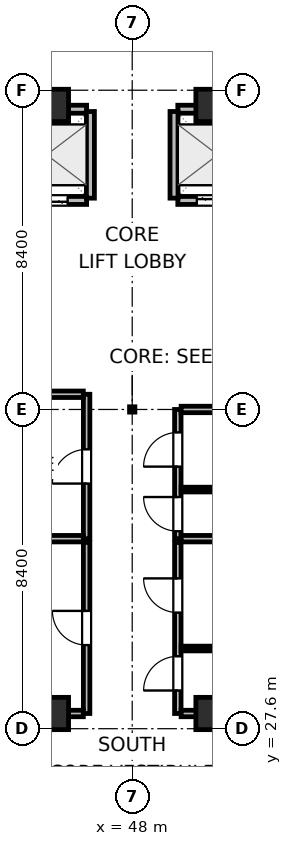
"""IFC4 building model, lengths in metres.
Left out: names, types, materials, properties, quantities, classifications, styles, units other than length and angle.
Written with IfcOpenShell. Run it as: python <this file> out.ifc"""

import sys

from ifc_helpers import new_model, si_unit, direction, frame, frame_2d, origin, origin_2d, place, context, subcontext, project, spatial, rectangle, extrude, element, fill, save


model = new_model("IFC4")
c1 = context("Model", 3, precision=1e-05, world=origin(), true_north=direction((0.0, 1.0)))
c2 = subcontext(c1, "Body", "Model", "MODEL_VIEW")
j1 = project(units=[si_unit("LENGTHUNIT", "METRE"), si_unit("PLANEANGLEUNIT", "RADIAN")], contexts=[c1])
p1 = place(None, origin())
s1 = spatial("IfcSite", under=j1, at=p1, CompositionType="ELEMENT")
p2 = place(p1, origin())
s2 = spatial("IfcBuilding", under=s1, at=p2, CompositionType="ELEMENT")
p3 = place(p2, frame((0.0, 0.0, 125.4)))
s3 = spatial("IfcBuildingStorey", under=s2, at=p3, CompositionType="ELEMENT", Elevation=125.4)
for number, where, z_axis, x_axis in (
    (1, (45.9, 28.0, 0.0), (0.0, 0.0, 1.0), (1.0, 0.0, 0.0)),
    (2, (50.1, 28.0, 0.0), (0.0, 0.0, 1.0), (1.0, 0.0, 0.0)),
    (3, (45.9, 44.0, 0.0), (0.0, 0.0, 1.0), (1.0, 0.0, 0.0)),
    (4, (50.1, 44.0, 0.0), (0.0, 0.0, 1.0), (1.0, 0.0, 0.0)),
):
    element("IfcColumn", number, at=place(p3, frame(where, z_axis=z_axis, x_axis=x_axis)), inside=s3, PredefinedType="COLUMN", context=c2, shape_type="SweptSolid", body=[
        extrude(rectangle(XDim=0.85, YDim=0.85, at=origin_2d()), origin(), (0.0, 0.0, 1.0), 4.5),
    ])
p4 = place(p3, frame((44.7, 41.5, 0.0), z_axis=(0.0, 0.0, 1.0), x_axis=(1.0, 0.0, 0.0)))
e5 = element("IfcWall", 5, at=p4, inside=s3, PredefinedType="PARTITIONING", context=c2, shape_type="SweptSolid", body=[
    extrude(rectangle(XDim=2.1, YDim=0.21, at=frame_2d((1.05, 0.0))), origin(), (0.0, 0.0, 1.0), 4.24),
])
p5 = place(p4, frame((0.5, 0.0, 0.0)))
e6 = element("IfcOpeningElement", 6, at=p5, cuts=e5, PredefinedType="OPENING", context=c2, shape_type="SweptSolid", body=[
    extrude(rectangle(XDim=1.1, YDim=2.04, at=frame_2d((0.55, 1.02))), frame((0.0, 0.115, 0.0), z_axis=(0.0, -1.0, 0.0), x_axis=(1.0, 0.0, 0.0)), (0.0, 0.0, 1.0), 0.23),
])
p6 = place(p3, frame((44.7, 43.9, 0.0), z_axis=(0.0, 0.0, 1.0), x_axis=(1.0, 0.0, 0.0)))
e7 = element("IfcWall", 7, at=p6, inside=s3, PredefinedType="PARTITIONING", context=c2, shape_type="SweptSolid", body=[
    extrude(rectangle(XDim=2.1, YDim=0.21, at=frame_2d((1.05, 0.0))), origin(), (0.0, 0.0, 1.0), 3.125),
])
p7 = place(p3, frame((46.9, 41.56, 0.0), z_axis=(0.0, 0.0, 1.0), x_axis=(0.0, 1.0, 0.0)))
e8 = element("IfcWall", 8, at=p7, inside=s3, PredefinedType="PARTITIONING", context=c2, shape_type="SweptSolid", body=[
    extrude(rectangle(XDim=2.28, YDim=0.21, at=frame_2d((1.14, 0.0))), origin(), (0.0, 0.0, 1.0), 4.24),
])
p8 = place(p3, frame((49.2, 41.5, 0.0), z_axis=(0.0, 0.0, 1.0), x_axis=(1.0, 0.0, 0.0)))
e9 = element("IfcWall", 9, at=p8, inside=s3, PredefinedType="PARTITIONING", context=c2, shape_type="SweptSolid", body=[
    extrude(rectangle(XDim=2.1, YDim=0.21, at=frame_2d((1.05, 0.0))), origin(), (0.0, 0.0, 1.0), 4.24),
])
p9 = place(p8, frame((0.5, 0.0, 0.0)))
e10 = element("IfcOpeningElement", 10, at=p9, cuts=e9, PredefinedType="OPENING", context=c2, shape_type="SweptSolid", body=[
    extrude(rectangle(XDim=1.1, YDim=2.04, at=frame_2d((0.55, 1.02))), frame((0.0, 0.115, 0.0), z_axis=(0.0, -1.0, 0.0), x_axis=(1.0, 0.0, 0.0)), (0.0, 0.0, 1.0), 0.23),
])
p10 = place(p3, frame((49.2, 43.9, 0.0), z_axis=(0.0, 0.0, 1.0), x_axis=(1.0, 0.0, 0.0)))
e11 = element("IfcWall", 11, at=p10, inside=s3, PredefinedType="PARTITIONING", context=c2, shape_type="SweptSolid", body=[
    extrude(rectangle(XDim=2.1, YDim=0.21, at=frame_2d((1.05, 0.0))), origin(), (0.0, 0.0, 1.0), 3.125),
])
p11 = place(p3, frame((49.1, 41.56, 0.0), z_axis=(0.0, 0.0, 1.0), x_axis=(0.0, 1.0, 0.0)))
e12 = element("IfcWall", 12, at=p11, inside=s3, PredefinedType="PARTITIONING", context=c2, shape_type="SweptSolid", body=[
    extrude(rectangle(XDim=2.28, YDim=0.21, at=frame_2d((1.14, 0.0))), origin(), (0.0, 0.0, 1.0), 4.24),
])
p12 = place(p3, frame((46.8, 32.6, 0.0), z_axis=(0.0, 0.0, 1.0), x_axis=(0.0, 1.0, 0.0)))
e13 = element("IfcWall", 13, at=p12, inside=s3, PredefinedType="PARTITIONING", context=c2, shape_type="SweptSolid", body=[
    extrude(rectangle(XDim=3.8, YDim=0.17, at=frame_2d((1.9, 0.0))), origin(), (0.0, 0.0, 1.0), 4.24),
])
p13 = place(p12, frame((1.45, 0.0, 0.0)))
e14 = element("IfcOpeningElement", 14, at=p13, cuts=e13, PredefinedType="OPENING", context=c2, shape_type="SweptSolid", body=[
    extrude(rectangle(XDim=0.9, YDim=2.02, at=frame_2d((0.45, 1.01))), frame((0.0, 0.095, 0.0), z_axis=(0.0, -1.0, 0.0), x_axis=(1.0, 0.0, 0.0)), (0.0, 0.0, 1.0), 0.19),
])
for number, where, z_axis, x_axis in (
    (15, (43.8, 32.6, 0.0), (0.0, 0.0, 1.0), (1.0, 0.0, 0.0)),
    (16, (43.8, 36.4, 0.0), (0.0, 0.0, 1.0), (1.0, 0.0, 0.0)),
):
    element("IfcWall", number, at=place(p3, frame(where, z_axis=z_axis, x_axis=x_axis)), inside=s3, PredefinedType="PARTITIONING", context=c2, shape_type="SweptSolid", body=[
        extrude(rectangle(XDim=2.913, YDim=0.17, at=frame_2d((1.457, 0.0))), origin(), (0.0, 0.0, 1.0), 4.24),
    ])
p14 = place(p3, frame((49.2, 32.6, 0.0), z_axis=(0.0, 0.0, 1.0), x_axis=(0.0, 1.0, 0.0)))
e17 = element("IfcWall", 17, at=p14, inside=s3, PredefinedType="PARTITIONING", context=c2, shape_type="SweptSolid", body=[
    extrude(rectangle(XDim=3.4, YDim=0.17, at=frame_2d((1.7, 0.0))), origin(), (0.0, 0.0, 1.0), 4.24),
])
p15 = place(p14, frame((0.196, 0.0, 0.0)))
e18 = element("IfcOpeningElement", 18, at=p15, cuts=e17, PredefinedType="OPENING", context=c2, shape_type="SweptSolid", body=[
    extrude(rectangle(XDim=0.9, YDim=2.02, at=frame_2d((0.45, 1.01))), frame((0.0, 0.095, 0.0), z_axis=(0.0, -1.0, 0.0), x_axis=(1.0, 0.0, 0.0)), (0.0, 0.0, 1.0), 0.19),
])
p16 = place(p14, frame((1.896, 0.0, 0.0)))
e19 = element("IfcOpeningElement", 19, at=p16, cuts=e17, PredefinedType="OPENING", context=c2, shape_type="SweptSolid", body=[
    extrude(rectangle(XDim=0.9, YDim=2.02, at=frame_2d((0.45, 1.01))), frame((0.0, 0.095, 0.0), z_axis=(0.0, -1.0, 0.0), x_axis=(1.0, 0.0, 0.0)), (0.0, 0.0, 1.0), 0.19),
])
for number, where, z_axis, x_axis in (
    (20, (49.287, 32.6, 0.0), (0.0, 0.0, 1.0), (1.0, 0.0, 0.0)),
    (21, (49.287, 36.0, 0.0), (0.0, 0.0, 1.0), (1.0, 0.0, 0.0)),
):
    element("IfcWall", number, at=place(p3, frame(where, z_axis=z_axis, x_axis=x_axis)), inside=s3, PredefinedType="PARTITIONING", context=c2, shape_type="SweptSolid", body=[
        extrude(rectangle(XDim=2.913, YDim=0.17, at=frame_2d((1.457, 0.0))), origin(), (0.0, 0.0, 1.0), 4.24),
    ])
p17 = place(p3, frame((49.287, 33.892, 0.0), z_axis=(0.0, 0.0, 1.0), x_axis=(1.0, 0.0, 0.0)))
e22 = element("IfcWall", 22, at=p17, inside=s3, PredefinedType="PARTITIONING", context=c2, shape_type="SweptSolid", body=[
    extrude(rectangle(XDim=2.913, YDim=0.125, at=frame_2d((1.457, 0.0))), origin(), (0.0, 0.0, 1.0), 4.24),
])
p18 = place(p3, frame((46.8, 28.0, 0.0), z_axis=(0.0, 0.0, 1.0), x_axis=(0.0, 1.0, 0.0)))
e23 = element("IfcWall", 23, at=p18, inside=s3, PredefinedType="PARTITIONING", context=c2, shape_type="SweptSolid", body=[
    extrude(rectangle(XDim=4.5, YDim=0.17, at=frame_2d((2.25, 0.0))), origin(), (0.0, 0.0, 1.0), 4.24),
])
p19 = place(p18, frame((1.8, 0.0, 0.0)))
e24 = element("IfcOpeningElement", 24, at=p19, cuts=e23, PredefinedType="OPENING", context=c2, shape_type="SweptSolid", body=[
    extrude(rectangle(XDim=0.9, YDim=2.02, at=frame_2d((0.45, 1.01))), frame((0.0, 0.095, 0.0), z_axis=(0.0, -1.0, 0.0), x_axis=(1.0, 0.0, 0.0)), (0.0, 0.0, 1.0), 0.19),
])
p20 = place(p3, frame((42.5, 28.0, 0.0), z_axis=(0.0, 0.0, 1.0), x_axis=(1.0, 0.0, 0.0)))
e25 = element("IfcWall", 25, at=p20, inside=s3, PredefinedType="PARTITIONING", context=c2, shape_type="SweptSolid", body=[
    extrude(rectangle(XDim=4.213, YDim=0.17, at=frame_2d((2.106, 0.0))), origin(), (0.0, 0.0, 1.0), 3.125),
])
p21 = place(p3, frame((49.2, 28.0, 0.0), z_axis=(0.0, 0.0, 1.0), x_axis=(0.0, 1.0, 0.0)))
e26 = element("IfcWall", 26, at=p21, inside=s3, PredefinedType="PARTITIONING", context=c2, shape_type="SweptSolid", body=[
    extrude(rectangle(XDim=4.5, YDim=0.17, at=frame_2d((2.25, 0.0))), origin(), (0.0, 0.0, 1.0), 4.24),
])
p22 = place(p21, frame((0.605, 0.0, 0.0)))
e27 = element("IfcOpeningElement", 27, at=p22, cuts=e26, PredefinedType="OPENING", context=c2, shape_type="SweptSolid", body=[
    extrude(rectangle(XDim=0.9, YDim=2.02, at=frame_2d((0.45, 1.01))), frame((0.0, 0.095, 0.0), z_axis=(0.0, -1.0, 0.0), x_axis=(1.0, 0.0, 0.0)), (0.0, 0.0, 1.0), 0.19),
])
p23 = place(p21, frame((2.655, 0.0, 0.0)))
e28 = element("IfcOpeningElement", 28, at=p23, cuts=e26, PredefinedType="OPENING", context=c2, shape_type="SweptSolid", body=[
    extrude(rectangle(XDim=0.9, YDim=2.02, at=frame_2d((0.45, 1.01))), frame((0.0, 0.095, 0.0), z_axis=(0.0, -1.0, 0.0), x_axis=(1.0, 0.0, 0.0)), (0.0, 0.0, 1.0), 0.19),
])
p24 = place(p3, frame((49.287, 28.0, 0.0), z_axis=(0.0, 0.0, 1.0), x_axis=(1.0, 0.0, 0.0)))
e29 = element("IfcWall", 29, at=p24, inside=s3, PredefinedType="PARTITIONING", context=c2, shape_type="SweptSolid", body=[
    extrude(rectangle(XDim=4.213, YDim=0.17, at=frame_2d((2.106, 0.0))), origin(), (0.0, 0.0, 1.0), 3.125),
])
p25 = place(p3, frame((49.287, 29.71, 0.0), z_axis=(0.0, 0.0, 1.0), x_axis=(1.0, 0.0, 0.0)))
e30 = element("IfcWall", 30, at=p25, inside=s3, PredefinedType="PARTITIONING", context=c2, shape_type="SweptSolid", body=[
    extrude(rectangle(XDim=4.213, YDim=0.125, at=frame_2d((2.106, 0.0))), origin(), (0.0, 0.0, 1.0), 4.24),
])
p26 = place(p5, origin())
e31 = element("IfcDoor", 31, at=p26, inside=s3, OperationType="DOUBLE_DOOR_SLIDING", PredefinedType="DOOR", context=c2, shape_type="SweptSolid", body=[
    extrude(rectangle(XDim=1.1, YDim=2.04, at=frame_2d((0.55, 1.02))), frame((0.0, 0.025, 0.0), z_axis=(0.0, -1.0, 0.0), x_axis=(1.0, 0.0, 0.0)), (0.0, 0.0, 1.0), 0.05),
])
fill(e6, e31)
p27 = place(p9, origin())
e32 = element("IfcDoor", 32, at=p27, inside=s3, OperationType="DOUBLE_DOOR_SLIDING", PredefinedType="DOOR", context=c2, shape_type="SweptSolid", body=[
    extrude(rectangle(XDim=1.1, YDim=2.04, at=frame_2d((0.55, 1.02))), frame((0.0, 0.025, 0.0), z_axis=(0.0, -1.0, 0.0), x_axis=(1.0, 0.0, 0.0)), (0.0, 0.0, 1.0), 0.05),
])
fill(e10, e32)
p28 = place(p13, origin())
e33 = element("IfcDoor", 33, at=p28, inside=s3, OperationType="SINGLE_SWING_LEFT", PredefinedType="DOOR", context=c2, shape_type="SweptSolid", body=[
    extrude(rectangle(XDim=0.9, YDim=2.02, at=frame_2d((0.45, 1.01))), frame((0.0, 0.025, 0.0), z_axis=(0.0, -1.0, 0.0), x_axis=(1.0, 0.0, 0.0)), (0.0, 0.0, 1.0), 0.05),
])
fill(e14, e33)
p29 = place(p15, origin())
e34 = element("IfcDoor", 34, at=p29, inside=s3, OperationType="SINGLE_SWING_RIGHT", PredefinedType="DOOR", context=c2, shape_type="SweptSolid", body=[
    extrude(rectangle(XDim=0.9, YDim=2.02, at=frame_2d((0.45, 1.01))), frame((0.0, 0.025, 0.0), z_axis=(0.0, -1.0, 0.0), x_axis=(1.0, 0.0, 0.0)), (0.0, 0.0, 1.0), 0.05),
])
fill(e18, e34)
p30 = place(p16, origin())
e35 = element("IfcDoor", 35, at=p30, inside=s3, OperationType="SINGLE_SWING_LEFT", PredefinedType="DOOR", context=c2, shape_type="SweptSolid", body=[
    extrude(rectangle(XDim=0.9, YDim=2.02, at=frame_2d((0.45, 1.01))), frame((0.0, 0.025, 0.0), z_axis=(0.0, -1.0, 0.0), x_axis=(1.0, 0.0, 0.0)), (0.0, 0.0, 1.0), 0.05),
])
fill(e19, e35)
p31 = place(p19, origin())
e36 = element("IfcDoor", 36, at=p31, inside=s3, OperationType="SINGLE_SWING_RIGHT", PredefinedType="DOOR", context=c2, shape_type="SweptSolid", body=[
    extrude(rectangle(XDim=0.9, YDim=2.02, at=frame_2d((0.45, 1.01))), frame((0.0, 0.025, 0.0), z_axis=(0.0, -1.0, 0.0), x_axis=(1.0, 0.0, 0.0)), (0.0, 0.0, 1.0), 0.05),
])
fill(e24, e36)
p32 = place(p22, origin())
e37 = element("IfcDoor", 37, at=p32, inside=s3, OperationType="SINGLE_SWING_LEFT", PredefinedType="DOOR", context=c2, shape_type="SweptSolid", body=[
    extrude(rectangle(XDim=0.9, YDim=2.02, at=frame_2d((0.45, 1.01))), frame((0.0, 0.025, 0.0), z_axis=(0.0, -1.0, 0.0), x_axis=(1.0, 0.0, 0.0)), (0.0, 0.0, 1.0), 0.05),
])
fill(e27, e37)
p33 = place(p23, origin())
e38 = element("IfcDoor", 38, at=p33, inside=s3, OperationType="SINGLE_SWING_RIGHT", PredefinedType="DOOR", context=c2, shape_type="SweptSolid", body=[
    extrude(rectangle(XDim=0.9, YDim=2.02, at=frame_2d((0.45, 1.01))), frame((0.0, 0.025, 0.0), z_axis=(0.0, -1.0, 0.0), x_axis=(1.0, 0.0, 0.0)), (0.0, 0.0, 1.0), 0.05),
])
fill(e28, e38)
save(model, sys.argv[1])
